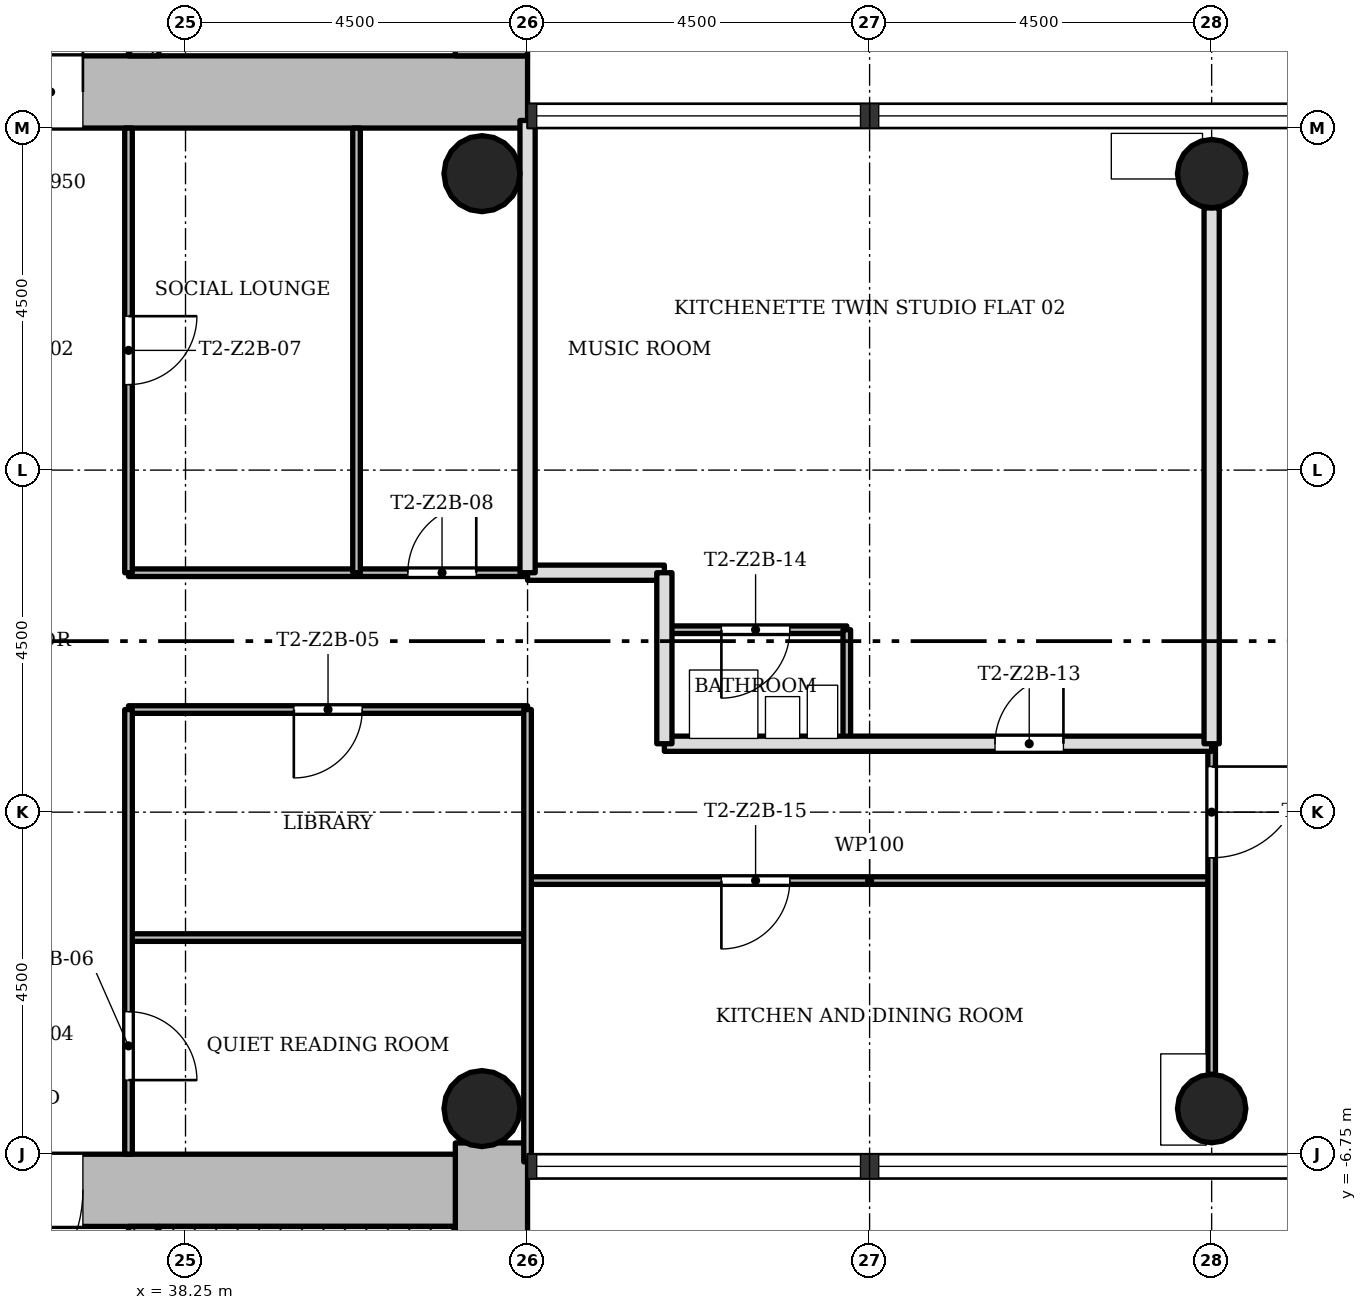
"""IFC4 building model, lengths in metres.
Left out: names, types, materials, properties, quantities, classifications, styles, units other than length and angle.
Written with IfcOpenShell. Run it as: python <this file> out.ifc"""

import sys

from ifc_helpers import new_model, si_unit, direction, frame, frame_2d, origin, origin_2d, place, context, subcontext, project, spatial, rectangle, hollow_circle, extrude, element, fill, save


model = new_model("IFC4")
c1 = context("Model", 3, precision=1e-05, world=origin(), true_north=direction((0.0, 1.0)))
c2 = subcontext(c1, "Body", "Model", "MODEL_VIEW")
j1 = project(units=[si_unit("LENGTHUNIT", "METRE"), si_unit("PLANEANGLEUNIT", "RADIAN")], contexts=[c1])
p1 = place(None, origin())
s1 = spatial("IfcSite", under=j1, at=p1, CompositionType="ELEMENT")
p2 = place(p1, origin())
s2 = spatial("IfcBuilding", under=s1, at=p2, CompositionType="ELEMENT")
p3 = place(p2, frame((0.0, 0.0, 80.0)))
s3 = spatial("IfcBuildingStorey", under=s2, at=p3, CompositionType="ELEMENT", Elevation=80.0)
p4 = place(p3, frame((30.2, 7.225, 0.0), z_axis=(0.0, 0.0, 1.0), x_axis=(1.0, 0.0, 0.0)))
e1 = element("IfcWall", 1, at=p4, inside=s3, PredefinedType="SHEAR", context=c2, shape_type="SweptSolid", body=[
    extrude(rectangle(XDim=12.55, YDim=0.95, at=frame_2d((6.275, 0.0))), origin(), (0.0, 0.0, 1.0), 3.4),
])
p5 = place(p4, frame((4.9, 0.0, 0.0)))
e2 = element("IfcOpeningElement", 2, at=p5, cuts=e1, PredefinedType="OPENING", context=c2, shape_type="SweptSolid", body=[
    extrude(rectangle(XDim=1.8, YDim=2.1, at=frame_2d((0.9, 1.05))), frame((0.0, 0.485, 0.0), z_axis=(0.0, -1.0, 0.0), x_axis=(1.0, 0.0, 0.0)), (0.0, 0.0, 1.0), 0.97),
])
p6 = place(p3, frame((42.275, 7.7, 0.0), z_axis=(0.0, 0.0, 1.0), x_axis=(0.0, 1.0, 0.0)))
e3 = element("IfcWall", 3, at=p6, inside=s3, PredefinedType="SHEAR", context=c2, shape_type="SweptSolid", body=[
    extrude(rectangle(XDim=8.05, YDim=0.95, at=frame_2d((4.025, 0.0))), origin(), (0.0, 0.0, 1.0), 3.4),
])
p7 = place(p3, frame((37.7, 7.7, 0.0), z_axis=(0.0, 0.0, 1.0), x_axis=(0.0, 1.0, 0.0)))
e4 = element("IfcWall", 4, at=p7, inside=s3, PredefinedType="SHEAR", context=c2, shape_type="SweptSolid", body=[
    extrude(rectangle(XDim=7.1, YDim=0.4, at=frame_2d((3.55, 0.0))), origin(), (0.0, 0.0, 1.0), 3.4),
])
p8 = place(p7, frame((0.8, 0.0, 0.0)))
e5 = element("IfcOpeningElement", 5, at=p8, cuts=e4, PredefinedType="OPENING", context=c2, shape_type="SweptSolid", body=[
    extrude(rectangle(XDim=1.1, YDim=2.1, at=frame_2d((0.55, 1.05))), frame((0.0, 0.21, 0.0), z_axis=(0.0, -1.0, 0.0), x_axis=(1.0, 0.0, 0.0)), (0.0, 0.0, 1.0), 0.42),
])
p9 = place(p7, frame((3.0, 0.0, 0.0)))
e6 = element("IfcOpeningElement", 6, at=p9, cuts=e4, PredefinedType="OPENING", context=c2, shape_type="SweptSolid", body=[
    extrude(rectangle(XDim=1.1, YDim=2.1, at=frame_2d((0.55, 1.05))), frame((0.0, 0.21, 0.0), z_axis=(0.0, -1.0, 0.0), x_axis=(1.0, 0.0, 0.0)), (0.0, 0.0, 1.0), 0.42),
])
p10 = place(p7, frame((5.2, 0.0, 0.0)))
e7 = element("IfcOpeningElement", 7, at=p10, cuts=e4, PredefinedType="OPENING", context=c2, shape_type="SweptSolid", body=[
    extrude(rectangle(XDim=1.1, YDim=2.1, at=frame_2d((0.55, 1.05))), frame((0.0, 0.21, 0.0), z_axis=(0.0, -1.0, 0.0), x_axis=(1.0, 0.0, 0.0)), (0.0, 0.0, 1.0), 0.42),
])
p11 = place(p3, frame((42.275, -14.8, 0.0), z_axis=(0.0, 0.0, 1.0), x_axis=(0.0, 1.0, 0.0)))
e8 = element("IfcWall", 8, at=p11, inside=s3, PredefinedType="SHEAR", context=c2, shape_type="SweptSolid", body=[
    extrude(rectangle(XDim=8.198, YDim=0.95, at=frame_2d((4.099, 0.0))), origin(), (0.0, 0.0, 1.0), 3.4),
])
p12 = place(p3, frame((41.8, -7.225, 0.0), z_axis=(0.0, 0.0, 1.0), x_axis=(-1.0, 0.0, 0.0)))
e9 = element("IfcWall", 9, at=p12, inside=s3, PredefinedType="SHEAR", context=c2, shape_type="SweptSolid", body=[
    extrude(rectangle(XDim=12.55, YDim=0.95, at=frame_2d((6.275, 0.0))), origin(), (0.0, 0.0, 1.0), 3.4),
])
p13 = place(p12, frame((4.9, 0.0, 0.0)))
e10 = element("IfcOpeningElement", 10, at=p13, cuts=e9, PredefinedType="OPENING", context=c2, shape_type="SweptSolid", body=[
    extrude(rectangle(XDim=1.8, YDim=2.1, at=frame_2d((0.9, 1.05))), frame((0.0, 0.485, 0.0), z_axis=(0.0, -1.0, 0.0), x_axis=(1.0, 0.0, 0.0)), (0.0, 0.0, 1.0), 0.97),
])
p14 = place(p3, frame((37.7, -14.8, 0.0), z_axis=(0.0, 0.0, 1.0), x_axis=(0.0, 1.0, 0.0)))
e11 = element("IfcWall", 11, at=p14, inside=s3, PredefinedType="SHEAR", context=c2, shape_type="SweptSolid", body=[
    extrude(rectangle(XDim=7.1, YDim=0.4, at=frame_2d((3.55, 0.0))), origin(), (0.0, 0.0, 1.0), 3.4),
])
p15 = place(p14, frame((5.5, 0.0, 0.0)))
e12 = element("IfcOpeningElement", 12, at=p15, cuts=e11, PredefinedType="OPENING", context=c2, shape_type="SweptSolid", body=[
    extrude(rectangle(XDim=0.9, YDim=2.1, at=frame_2d((0.45, 1.05))), frame((0.0, 0.21, 0.0), z_axis=(0.0, -1.0, 0.0), x_axis=(1.0, 0.0, 0.0)), (0.0, 0.0, 1.0), 0.42),
])
for number, where, z_axis, x_axis in (
    (13, (51.75, -6.15, 0.0), (0.0, 0.0, 1.0), (1.0, 0.0, 0.0)),
    (14, (51.75, 6.15, 0.0), (0.0, 0.0, 1.0), (1.0, 0.0, 0.0)),
):
    element("IfcColumn", number, at=place(p3, frame(where, z_axis=z_axis, x_axis=x_axis)), inside=s3, PredefinedType="COLUMN", context=c2, shape_type="SweptSolid", body=[
        extrude(hollow_circle(Radius=0.45, WallThickness=0.032, at=origin_2d()), origin(), (0.0, 0.0, 1.0), 3.4),
    ])
for number, where, z_axis, x_axis in (
    (15, (42.15, -6.15, 0.0), (0.0, 0.0, 1.0), (1.0, 0.0, 0.0)),
    (16, (42.15, 6.15, 0.0), (0.0, 0.0, 1.0), (1.0, 0.0, 0.0)),
):
    element("IfcColumn", number, at=place(p3, frame(where, z_axis=z_axis, x_axis=x_axis)), inside=s3, PredefinedType="COLUMN", context=c2, shape_type="SweptSolid", body=[
        extrude(hollow_circle(Radius=0.5, WallThickness=0.036, at=origin_2d()), origin(), (0.0, 0.0, 1.0), 3.4),
    ])
p16 = place(p3, frame((42.75, -3.9, 0.0), z_axis=(0.0, 0.0, 1.0), x_axis=(-1.0, 0.0, 0.0)))
e17 = element("IfcWall", 17, at=p16, inside=s3, PredefinedType="PARTITIONING", context=c2, shape_type="SweptSolid", body=[
    extrude(rectangle(XDim=5.25, YDim=0.1, at=frame_2d((2.625, 0.0))), origin(), (0.0, 0.0, 1.0), 3.0),
])
p17 = place(p3, frame((51.75, -3.15, 0.0), z_axis=(0.0, 0.0, 1.0), x_axis=(-1.0, 0.0, 0.0)))
e18 = element("IfcWall", 18, at=p17, inside=s3, PredefinedType="PARTITIONING", context=c2, shape_type="SweptSolid", body=[
    extrude(rectangle(XDim=9.0, YDim=0.1, at=frame_2d((4.5, 0.0))), origin(), (0.0, 0.0, 1.0), 3.0),
])
p18 = place(p17, frame((5.55, 0.0, 0.0)))
e19 = element("IfcOpeningElement", 19, at=p18, cuts=e18, PredefinedType="OPENING", context=c2, shape_type="SweptSolid", body=[
    extrude(rectangle(XDim=0.9, YDim=2.1, at=frame_2d((0.45, 1.05))), frame((0.0, 0.06, 0.0), z_axis=(0.0, -1.0, 0.0), x_axis=(1.0, 0.0, 0.0)), (0.0, 0.0, 1.0), 0.12),
])
p19 = place(p3, frame((51.75, -1.35, 0.0), z_axis=(0.0, 0.0, 1.0), x_axis=(-1.0, 0.0, 0.0)))
e20 = element("IfcWall", 20, at=p19, inside=s3, PredefinedType="SOLIDWALL", context=c2, shape_type="SweptSolid", body=[
    extrude(rectangle(XDim=7.2, YDim=0.2, at=frame_2d((3.6, 0.0))), origin(), (0.0, 0.0, 1.0), 3.0),
])
p20 = place(p19, frame((1.95, 0.0, 0.0)))
e21 = element("IfcOpeningElement", 21, at=p20, cuts=e20, PredefinedType="OPENING", context=c2, shape_type="SweptSolid", body=[
    extrude(rectangle(XDim=0.9, YDim=2.1, at=frame_2d((0.45, 1.05))), frame((0.0, 0.11, 0.0), z_axis=(0.0, -1.0, 0.0), x_axis=(1.0, 0.0, 0.0)), (0.0, 0.0, 1.0), 0.22),
])
p21 = place(p3, frame((42.75, -0.9, 0.0), z_axis=(0.0, 0.0, 1.0), x_axis=(-1.0, 0.0, 0.0)))
e22 = element("IfcWall", 22, at=p21, inside=s3, PredefinedType="PARTITIONING", context=c2, shape_type="SweptSolid", body=[
    extrude(rectangle(XDim=5.25, YDim=0.1, at=frame_2d((2.625, 0.0))), origin(), (0.0, 0.0, 1.0), 3.0),
])
p22 = place(p21, frame((2.175, 0.0, 0.0)))
e23 = element("IfcOpeningElement", 23, at=p22, cuts=e22, PredefinedType="OPENING", context=c2, shape_type="SweptSolid", body=[
    extrude(rectangle(XDim=0.9, YDim=2.1, at=frame_2d((0.45, 1.05))), frame((0.0, 0.06, 0.0), z_axis=(0.0, -1.0, 0.0), x_axis=(1.0, 0.0, 0.0)), (0.0, 0.0, 1.0), 0.12),
])
p23 = place(p3, frame((46.95, 0.15, 0.0), z_axis=(0.0, 0.0, 1.0), x_axis=(-1.0, 0.0, 0.0)))
e24 = element("IfcWall", 24, at=p23, inside=s3, PredefinedType="PARTITIONING", context=c2, shape_type="SweptSolid", body=[
    extrude(rectangle(XDim=2.4, YDim=0.1, at=frame_2d((1.2, 0.0))), origin(), (0.0, 0.0, 1.0), 3.0),
])
p24 = place(p23, frame((0.75, 0.0, 0.0)))
e25 = element("IfcOpeningElement", 25, at=p24, cuts=e24, PredefinedType="OPENING", context=c2, shape_type="SweptSolid", body=[
    extrude(rectangle(XDim=0.9, YDim=2.1, at=frame_2d((0.45, 1.05))), frame((0.0, 0.06, 0.0), z_axis=(0.0, -1.0, 0.0), x_axis=(1.0, 0.0, 0.0)), (0.0, 0.0, 1.0), 0.12),
])
p25 = place(p3, frame((42.75, 0.9, 0.0), z_axis=(0.0, 0.0, 1.0), x_axis=(-1.0, 0.0, 0.0)))
e26 = element("IfcWall", 26, at=p25, inside=s3, PredefinedType="PARTITIONING", context=c2, shape_type="SweptSolid", body=[
    extrude(rectangle(XDim=5.25, YDim=0.1, at=frame_2d((2.625, 0.0))), origin(), (0.0, 0.0, 1.0), 3.0),
])
p26 = place(p25, frame((0.675, 0.0, 0.0)))
e27 = element("IfcOpeningElement", 27, at=p26, cuts=e26, PredefinedType="OPENING", context=c2, shape_type="SweptSolid", body=[
    extrude(rectangle(XDim=0.9, YDim=2.1, at=frame_2d((0.45, 1.05))), frame((0.0, 0.06, 0.0), z_axis=(0.0, -1.0, 0.0), x_axis=(1.0, 0.0, 0.0)), (0.0, 0.0, 1.0), 0.12),
])
p27 = place(p3, frame((44.55, 0.9, 0.0), z_axis=(0.0, 0.0, 1.0), x_axis=(-1.0, 0.0, 0.0)))
e28 = element("IfcWall", 28, at=p27, inside=s3, PredefinedType="SOLIDWALL", context=c2, shape_type="SweptSolid", body=[
    extrude(rectangle(XDim=1.8, YDim=0.2, at=frame_2d((0.9, 0.0))), origin(), (0.0, 0.0, 1.0), 3.0),
])
p28 = place(p3, frame((51.75, -5.7, 0.0), z_axis=(0.0, 0.0, 1.0), x_axis=(0.0, 1.0, 0.0)))
e29 = element("IfcWall", 29, at=p28, inside=s3, PredefinedType="PARTITIONING", context=c2, shape_type="SweptSolid", body=[
    extrude(rectangle(XDim=4.35, YDim=0.1, at=frame_2d((2.175, 0.0))), origin(), (0.0, 0.0, 1.0), 3.0),
])
p29 = place(p28, frame((2.85, 0.0, 0.0)))
e30 = element("IfcOpeningElement", 30, at=p29, cuts=e29, PredefinedType="OPENING", context=c2, shape_type="SweptSolid", body=[
    extrude(rectangle(XDim=1.2, YDim=2.1, at=frame_2d((0.6, 1.05))), frame((0.0, 0.06, 0.0), z_axis=(0.0, -1.0, 0.0), x_axis=(1.0, 0.0, 0.0)), (0.0, 0.0, 1.0), 0.12),
])
p30 = place(p3, frame((51.75, -1.35, 0.0), z_axis=(0.0, 0.0, 1.0), x_axis=(0.0, 1.0, 0.0)))
e31 = element("IfcWall", 31, at=p30, inside=s3, PredefinedType="SOLIDWALL", context=c2, shape_type="SweptSolid", body=[
    extrude(rectangle(XDim=7.05, YDim=0.2, at=frame_2d((3.525, 0.0))), origin(), (0.0, 0.0, 1.0), 3.0),
])
p31 = place(p3, frame((46.95, -1.35, 0.0), z_axis=(0.0, 0.0, 1.0), x_axis=(0.0, 1.0, 0.0)))
e32 = element("IfcWall", 32, at=p31, inside=s3, PredefinedType="PARTITIONING", context=c2, shape_type="SweptSolid", body=[
    extrude(rectangle(XDim=1.5, YDim=0.1, at=frame_2d((0.75, 0.0))), origin(), (0.0, 0.0, 1.0), 3.0),
])
p32 = place(p3, frame((44.55, -1.35, 0.0), z_axis=(0.0, 0.0, 1.0), x_axis=(0.0, 1.0, 0.0)))
e33 = element("IfcWall", 33, at=p32, inside=s3, PredefinedType="SOLIDWALL", context=c2, shape_type="SweptSolid", body=[
    extrude(rectangle(XDim=2.25, YDim=0.2, at=frame_2d((1.125, 0.0))), origin(), (0.0, 0.0, 1.0), 3.0),
])
p33 = place(p3, frame((42.75, -6.85, 0.0), z_axis=(0.0, 0.0, 1.0), x_axis=(0.0, 1.0, 0.0)))
e34 = element("IfcWall", 34, at=p33, inside=s3, PredefinedType="PARTITIONING", context=c2, shape_type="SweptSolid", body=[
    extrude(rectangle(XDim=5.95, YDim=0.1, at=frame_2d((2.975, 0.0))), origin(), (0.0, 0.0, 1.0), 3.0),
])
p34 = place(p3, frame((42.75, 0.9, 0.0), z_axis=(0.0, 0.0, 1.0), x_axis=(0.0, 1.0, 0.0)))
e35 = element("IfcWall", 35, at=p34, inside=s3, PredefinedType="SOLIDWALL", context=c2, shape_type="SweptSolid", body=[
    extrude(rectangle(XDim=5.95, YDim=0.2, at=frame_2d((2.975, 0.0))), origin(), (0.0, 0.0, 1.0), 3.0),
])
p35 = place(p3, frame((40.5, 0.9, 0.0), z_axis=(0.0, 0.0, 1.0), x_axis=(0.0, 1.0, 0.0)))
e36 = element("IfcWall", 36, at=p35, inside=s3, PredefinedType="PARTITIONING", context=c2, shape_type="SweptSolid", body=[
    extrude(rectangle(XDim=5.85, YDim=0.1, at=frame_2d((2.925, 0.0))), origin(), (0.0, 0.0, 1.0), 3.0),
])
p36 = place(p3, frame((37.5, -6.75, 0.0), z_axis=(0.0, 0.0, 1.0), x_axis=(0.0, 1.0, 0.0)))
e37 = element("IfcWall", 37, at=p36, inside=s3, PredefinedType="PARTITIONING", context=c2, shape_type="SweptSolid", body=[
    extrude(rectangle(XDim=5.85, YDim=0.1, at=frame_2d((2.925, 0.0))), origin(), (0.0, 0.0, 1.0), 3.0),
])
p37 = place(p36, frame((0.975, 0.0, 0.0)))
e38 = element("IfcOpeningElement", 38, at=p37, cuts=e37, PredefinedType="OPENING", context=c2, shape_type="SweptSolid", body=[
    extrude(rectangle(XDim=0.9, YDim=2.1, at=frame_2d((0.45, 1.05))), frame((0.0, 0.06, 0.0), z_axis=(0.0, -1.0, 0.0), x_axis=(1.0, 0.0, 0.0)), (0.0, 0.0, 1.0), 0.12),
])
p38 = place(p3, frame((37.5, 0.9, 0.0), z_axis=(0.0, 0.0, 1.0), x_axis=(0.0, 1.0, 0.0)))
e39 = element("IfcWall", 39, at=p38, inside=s3, PredefinedType="PARTITIONING", context=c2, shape_type="SweptSolid", body=[
    extrude(rectangle(XDim=5.85, YDim=0.1, at=frame_2d((2.925, 0.0))), origin(), (0.0, 0.0, 1.0), 3.0),
])
p39 = place(p38, frame((2.475, 0.0, 0.0)))
e40 = element("IfcOpeningElement", 40, at=p39, cuts=e39, PredefinedType="OPENING", context=c2, shape_type="SweptSolid", body=[
    extrude(rectangle(XDim=0.9, YDim=2.1, at=frame_2d((0.45, 1.05))), frame((0.0, 0.06, 0.0), z_axis=(0.0, -1.0, 0.0), x_axis=(1.0, 0.0, 0.0)), (0.0, 0.0, 1.0), 0.12),
])
p40 = place(p3, frame((37.9, -7.825, 0.0), z_axis=(0.0, 0.0, 1.0), x_axis=(1.0, 0.0, 0.0)))
e41 = element("IfcWall", 41, at=p40, inside=s3, PredefinedType="SHEAR", context=c2, shape_type="SweptSolid", body=[
    extrude(rectangle(XDim=3.9, YDim=0.25, at=frame_2d((1.95, 0.0))), origin(), (0.0, 0.0, 1.0), 3.4),
])
p41 = place(p22, origin())
e42 = element("IfcDoor", 42, at=p41, inside=s3, OperationType="SINGLE_SWING_LEFT", PredefinedType="DOOR", context=c2, shape_type="SweptSolid", body=[
    extrude(rectangle(XDim=0.9, YDim=2.1, at=frame_2d((0.45, 1.05))), frame((0.0, 0.025, 0.0), z_axis=(0.0, -1.0, 0.0), x_axis=(1.0, 0.0, 0.0)), (0.0, 0.0, 1.0), 0.05),
])
fill(e23, e42)
p42 = place(p37, origin())
e43 = element("IfcDoor", 43, at=p42, inside=s3, OperationType="SINGLE_SWING_LEFT", PredefinedType="DOOR", context=c2, shape_type="SweptSolid", body=[
    extrude(rectangle(XDim=0.9, YDim=2.1, at=frame_2d((0.45, 1.05))), frame((0.0, 0.025, 0.0), z_axis=(0.0, -1.0, 0.0), x_axis=(1.0, 0.0, 0.0)), (0.0, 0.0, 1.0), 0.05),
])
fill(e38, e43)
p43 = place(p39, origin())
e44 = element("IfcDoor", 44, at=p43, inside=s3, OperationType="SINGLE_SWING_RIGHT", PredefinedType="DOOR", context=c2, shape_type="SweptSolid", body=[
    extrude(rectangle(XDim=0.9, YDim=2.1, at=frame_2d((0.45, 1.05))), frame((0.0, 0.025, 0.0), z_axis=(0.0, -1.0, 0.0), x_axis=(1.0, 0.0, 0.0)), (0.0, 0.0, 1.0), 0.05),
])
fill(e40, e44)
p44 = place(p26, origin())
e45 = element("IfcDoor", 45, at=p44, inside=s3, OperationType="SINGLE_SWING_LEFT", PredefinedType="DOOR", context=c2, shape_type="SweptSolid", body=[
    extrude(rectangle(XDim=0.9, YDim=2.1, at=frame_2d((0.45, 1.05))), frame((0.0, 0.025, 0.0), z_axis=(0.0, -1.0, 0.0), x_axis=(1.0, 0.0, 0.0)), (0.0, 0.0, 1.0), 0.05),
])
fill(e27, e45)
p45 = place(p20, origin())
e46 = element("IfcDoor", 46, at=p45, inside=s3, OperationType="SINGLE_SWING_LEFT", PredefinedType="DOOR", context=c2, shape_type="SweptSolid", body=[
    extrude(rectangle(XDim=0.9, YDim=2.1, at=frame_2d((0.45, 1.05))), frame((0.0, 0.025, 0.0), z_axis=(0.0, -1.0, 0.0), x_axis=(1.0, 0.0, 0.0)), (0.0, 0.0, 1.0), 0.05),
])
fill(e21, e46)
p46 = place(p24, origin())
e47 = element("IfcDoor", 47, at=p46, inside=s3, OperationType="SINGLE_SWING_LEFT", PredefinedType="DOOR", context=c2, shape_type="SweptSolid", body=[
    extrude(rectangle(XDim=0.9, YDim=2.1, at=frame_2d((0.45, 1.05))), frame((0.0, 0.025, 0.0), z_axis=(0.0, -1.0, 0.0), x_axis=(1.0, 0.0, 0.0)), (0.0, 0.0, 1.0), 0.05),
])
fill(e25, e47)
p47 = place(p18, origin())
e48 = element("IfcDoor", 48, at=p47, inside=s3, OperationType="SINGLE_SWING_LEFT", PredefinedType="DOOR", context=c2, shape_type="SweptSolid", body=[
    extrude(rectangle(XDim=0.9, YDim=2.1, at=frame_2d((0.45, 1.05))), frame((0.0, 0.025, 0.0), z_axis=(0.0, -1.0, 0.0), x_axis=(1.0, 0.0, 0.0)), (0.0, 0.0, 1.0), 0.05),
])
fill(e19, e48)
p48 = place(p29, origin())
e49 = element("IfcDoor", 49, at=p48, inside=s3, OperationType="SINGLE_SWING_RIGHT", PredefinedType="DOOR", context=c2, shape_type="SweptSolid", body=[
    extrude(rectangle(XDim=1.2, YDim=2.1, at=frame_2d((0.6, 1.05))), frame((0.0, 0.025, 0.0), z_axis=(0.0, -1.0, 0.0), x_axis=(1.0, 0.0, 0.0)), (0.0, 0.0, 1.0), 0.05),
])
fill(e30, e49)
p49 = place(p5, origin())
e50 = element("IfcDoor", 50, at=p49, inside=s3, OperationType="SINGLE_SWING_LEFT", PredefinedType="DOOR", context=c2, shape_type="SweptSolid", body=[
    extrude(rectangle(XDim=1.8, YDim=2.1, at=frame_2d((0.9, 1.05))), frame((0.0, 0.025, 0.0), z_axis=(0.0, -1.0, 0.0), x_axis=(1.0, 0.0, 0.0)), (0.0, 0.0, 1.0), 0.05),
])
fill(e2, e50)
p50 = place(p13, origin())
e51 = element("IfcDoor", 51, at=p50, inside=s3, OperationType="SINGLE_SWING_LEFT", PredefinedType="DOOR", context=c2, shape_type="SweptSolid", body=[
    extrude(rectangle(XDim=1.8, YDim=2.1, at=frame_2d((0.9, 1.05))), frame((0.0, 0.025, 0.0), z_axis=(0.0, -1.0, 0.0), x_axis=(1.0, 0.0, 0.0)), (0.0, 0.0, 1.0), 0.05),
])
fill(e10, e51)
save(model, sys.argv[1])
